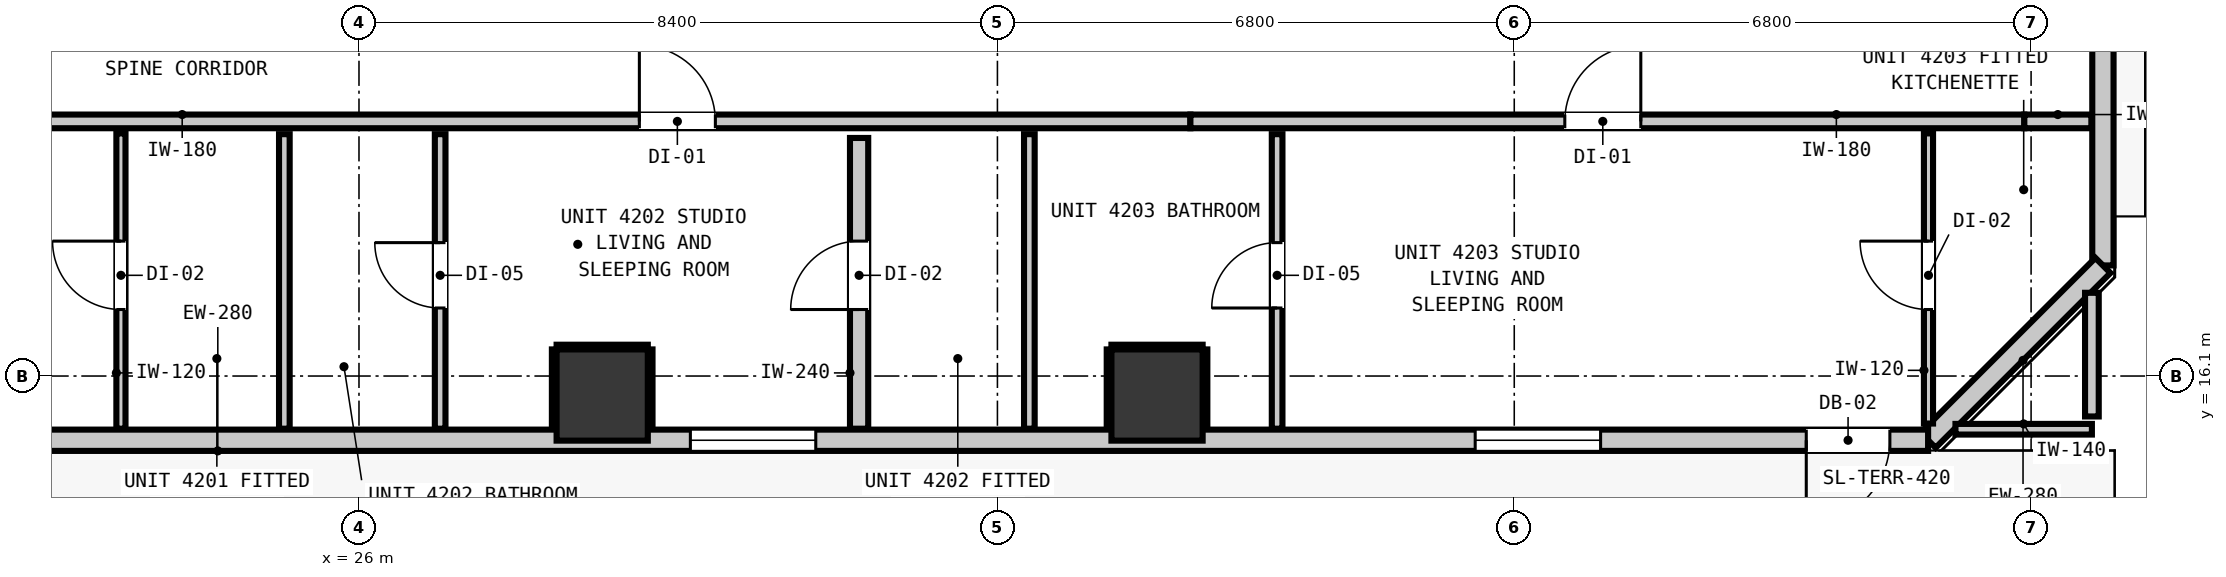
"""IFC4 building model, lengths in metres.
Left out: names, types, materials, properties, quantities, classifications, styles, units other than length and angle.
Written with IfcOpenShell. Run it as: python <this file> out.ifc"""

import sys

from ifc_helpers import new_model, si_unit, direction, frame, frame_2d, origin, origin_2d, place, context, subcontext, project, spatial, rectangle, extrude, element, fill, save


model = new_model("IFC4")
c1 = context("Model", 3, precision=1e-05, world=origin(), true_north=direction((0.0, 1.0)))
c2 = subcontext(c1, "Body", "Model", "MODEL_VIEW")
j1 = project(units=[si_unit("LENGTHUNIT", "METRE"), si_unit("PLANEANGLEUNIT", "RADIAN")], contexts=[c1])
p1 = place(None, origin())
s1 = spatial("IfcSite", under=j1, at=p1, CompositionType="ELEMENT")
p2 = place(p1, origin())
s2 = spatial("IfcBuilding", under=s1, at=p2, CompositionType="ELEMENT")
p3 = place(p2, frame((0.0, 0.0, 145.92)))
s3 = spatial("IfcBuildingStorey", under=s2, at=p3, CompositionType="ELEMENT", Elevation=145.92)
for number, where, z_axis, x_axis in (
    (1, (29.2, 15.85, -0.2), (0.0, 0.0, 1.0), (1.0, 0.0, 0.0)),
    (2, (36.5, 15.85, -0.2), (0.0, 0.0, 1.0), (1.0, 0.0, 0.0)),
):
    element("IfcColumn", number, at=place(p3, frame(where, z_axis=z_axis, x_axis=x_axis)), inside=s3, PredefinedType="COLUMN", context=c2, shape_type="SweptSolid", body=[
        extrude(rectangle(XDim=1.2, YDim=1.2, at=origin_2d()), origin(), (0.0, 0.0, 1.0), 3.52),
    ])
p4 = place(p3, frame((48.945, 49.845, 0.0), z_axis=(0.0, 0.0, 1.0), x_axis=(0.0, -1.0, 0.0)))
e3 = element("IfcWall", 3, at=p4, inside=s3, PredefinedType="STANDARD", context=c2, shape_type="SweptSolid", body=[
    extrude(rectangle(XDim=32.29, YDim=0.28, at=frame_2d((16.145, 0.0))), origin(), (0.0, 0.0, 1.0), 3.08),
])
p5 = place(p4, frame((0.904, 0.0, 0.0)))
e4 = element("IfcOpeningElement", 4, at=p5, cuts=e3, PredefinedType="OPENING", context=c2, shape_type="SweptSolid", body=[
    extrude(rectangle(XDim=1.0, YDim=2.15, at=frame_2d((0.5, 1.075))), frame((0.0, 0.15, 0.0), z_axis=(0.0, -1.0, 0.0), x_axis=(1.0, 0.0, 0.0)), (0.0, 0.0, 1.0), 0.3),
])
p6 = place(p4, frame((2.774, 0.0, 0.85)))
e5 = element("IfcOpeningElement", 5, at=p6, cuts=e3, PredefinedType="OPENING", context=c2, shape_type="SweptSolid", body=[
    extrude(rectangle(XDim=1.65, YDim=1.75, at=frame_2d((0.825, 0.875))), frame((0.0, 0.15, 0.0), z_axis=(0.0, -1.0, 0.0), x_axis=(1.0, 0.0, 0.0)), (0.0, 0.0, 1.0), 0.3),
])
p7 = place(p4, frame((23.582, 0.0, 0.85)))
e6 = element("IfcOpeningElement", 6, at=p7, cuts=e3, PredefinedType="OPENING", context=c2, shape_type="SweptSolid", body=[
    extrude(rectangle(XDim=1.65, YDim=1.75, at=frame_2d((0.825, 0.875))), frame((0.0, 0.15, 0.0), z_axis=(0.0, -1.0, 0.0), x_axis=(1.0, 0.0, 0.0)), (0.0, 0.0, 1.0), 0.3),
])
p8 = place(p4, frame((20.433, 0.0, 0.85)))
e7 = element("IfcOpeningElement", 7, at=p8, cuts=e3, PredefinedType="OPENING", context=c2, shape_type="SweptSolid", body=[
    extrude(rectangle(XDim=1.65, YDim=1.75, at=frame_2d((0.825, 0.875))), frame((0.0, 0.15, 0.0), z_axis=(0.0, -1.0, 0.0), x_axis=(1.0, 0.0, 0.0)), (0.0, 0.0, 1.0), 0.3),
])
p9 = place(p4, frame((14.048, 0.0, 0.85)))
e8 = element("IfcOpeningElement", 8, at=p9, cuts=e3, PredefinedType="OPENING", context=c2, shape_type="SweptSolid", body=[
    extrude(rectangle(XDim=1.65, YDim=1.75, at=frame_2d((0.825, 0.875))), frame((0.0, 0.15, 0.0), z_axis=(0.0, -1.0, 0.0), x_axis=(1.0, 0.0, 0.0)), (0.0, 0.0, 1.0), 0.3),
])
p10 = place(p4, frame((11.247, 0.0, 0.85)))
e9 = element("IfcOpeningElement", 9, at=p10, cuts=e3, PredefinedType="OPENING", context=c2, shape_type="SweptSolid", body=[
    extrude(rectangle(XDim=1.05, YDim=1.65, at=frame_2d((0.525, 0.825))), frame((0.0, 0.15, 0.0), z_axis=(0.0, -1.0, 0.0), x_axis=(1.0, 0.0, 0.0)), (0.0, 0.0, 1.0), 0.3),
])
p11 = place(p3, frame((48.945, 17.555, 0.0), z_axis=(0.0, 0.0, 1.0), x_axis=(-0.707106781187, -0.707106781187, 0.0)))
e10 = element("IfcWall", 10, at=p11, inside=s3, PredefinedType="STANDARD", context=c2, shape_type="SweptSolid", body=[
    extrude(rectangle(XDim=3.253, YDim=0.28, at=frame_2d((1.626, 0.0))), origin(), (0.0, 0.0, 1.0), 3.08),
])
p12 = place(p3, frame((46.645, 15.255, 0.0), z_axis=(0.0, 0.0, 1.0), x_axis=(-1.0, 0.0, 0.0)))
e11 = element("IfcWall", 11, at=p12, inside=s3, PredefinedType="STANDARD", context=c2, shape_type="SweptSolid", body=[
    extrude(rectangle(XDim=35.09, YDim=0.28, at=frame_2d((17.545, 0.0))), origin(), (0.0, 0.0, 1.0), 3.08),
])
p13 = place(p12, frame((0.503, 0.0, 0.0)))
e12 = element("IfcOpeningElement", 12, at=p13, cuts=e11, PredefinedType="OPENING", context=c2, shape_type="SweptSolid", body=[
    extrude(rectangle(XDim=1.1, YDim=2.15, at=frame_2d((0.55, 1.075))), frame((0.0, 0.15, 0.0), z_axis=(0.0, -1.0, 0.0), x_axis=(1.0, 0.0, 0.0)), (0.0, 0.0, 1.0), 0.3),
])
p14 = place(p12, frame((28.72, 0.0, 0.85)))
e13 = element("IfcOpeningElement", 13, at=p14, cuts=e11, PredefinedType="OPENING", context=c2, shape_type="SweptSolid", body=[
    extrude(rectangle(XDim=1.65, YDim=1.75, at=frame_2d((0.825, 0.875))), frame((0.0, 0.15, 0.0), z_axis=(0.0, -1.0, 0.0), x_axis=(1.0, 0.0, 0.0)), (0.0, 0.0, 1.0), 0.3),
])
p15 = place(p12, frame((14.635, 0.0, 0.85)))
e14 = element("IfcOpeningElement", 14, at=p15, cuts=e11, PredefinedType="OPENING", context=c2, shape_type="SweptSolid", body=[
    extrude(rectangle(XDim=1.65, YDim=1.75, at=frame_2d((0.825, 0.875))), frame((0.0, 0.15, 0.0), z_axis=(0.0, -1.0, 0.0), x_axis=(1.0, 0.0, 0.0)), (0.0, 0.0, 1.0), 0.3),
])
p16 = place(p12, frame((4.309, 0.0, 0.85)))
e15 = element("IfcOpeningElement", 15, at=p16, cuts=e11, PredefinedType="OPENING", context=c2, shape_type="SweptSolid", body=[
    extrude(rectangle(XDim=1.65, YDim=1.75, at=frame_2d((0.825, 0.875))), frame((0.0, 0.15, 0.0), z_axis=(0.0, -1.0, 0.0), x_axis=(1.0, 0.0, 0.0)), (0.0, 0.0, 1.0), 0.3),
])
p17 = place(p3, frame((9.407, 19.45, 0.0), z_axis=(0.0, 0.0, 1.0), x_axis=(1.0, 0.0, 0.0)))
e16 = element("IfcWall", 16, at=p17, inside=s3, PredefinedType="PARTITIONING", context=c2, shape_type="SweptSolid", body=[
    extrude(rectangle(XDim=27.532, YDim=0.18, at=frame_2d((13.766, 0.0))), origin(), (0.0, 0.0, 1.0), 3.08),
])
p18 = place(p17, frame((7.252, 0.0, 0.0)))
e17 = element("IfcOpeningElement", 17, at=p18, cuts=e16, PredefinedType="OPENING", context=c2, shape_type="SweptSolid", body=[
    extrude(rectangle(XDim=1.0, YDim=2.15, at=frame_2d((0.5, 1.075))), frame((0.0, 0.1, 0.0), z_axis=(0.0, -1.0, 0.0), x_axis=(1.0, 0.0, 0.0)), (0.0, 0.0, 1.0), 0.2),
])
p19 = place(p17, frame((20.282, 0.0, 0.0)))
e18 = element("IfcOpeningElement", 18, at=p19, cuts=e16, PredefinedType="OPENING", context=c2, shape_type="SweptSolid", body=[
    extrude(rectangle(XDim=1.0, YDim=2.15, at=frame_2d((0.5, 1.075))), frame((0.0, 0.1, 0.0), z_axis=(0.0, -1.0, 0.0), x_axis=(1.0, 0.0, 0.0)), (0.0, 0.0, 1.0), 0.2),
])
p20 = place(p3, frame((36.939, 19.45, 0.0), z_axis=(0.0, 0.0, 1.0), x_axis=(1.0, 0.0, 0.0)))
e19 = element("IfcWall", 19, at=p20, inside=s3, PredefinedType="PARTITIONING", context=c2, shape_type="SweptSolid", body=[
    extrude(rectangle(XDim=10.972, YDim=0.18, at=frame_2d((5.486, 0.0))), origin(), (0.0, 0.0, 1.0), 2.565),
])
p21 = place(p20, frame((4.926, 0.0, 0.0)))
e20 = element("IfcOpeningElement", 20, at=p21, cuts=e19, PredefinedType="OPENING", context=c2, shape_type="SweptSolid", body=[
    extrude(rectangle(XDim=1.0, YDim=2.15, at=frame_2d((0.5, 1.075))), frame((0.0, 0.1, 0.0), z_axis=(0.0, -1.0, 0.0), x_axis=(1.0, 0.0, 0.0)), (0.0, 0.0, 1.0), 0.2),
])
p22 = place(p3, frame((47.911, 19.45, 0.0), z_axis=(0.0, 0.0, 1.0), x_axis=(1.0, 0.0, 0.0)))
e21 = element("IfcWall", 21, at=p22, inside=s3, PredefinedType="PARTITIONING", context=c2, shape_type="SweptSolid", body=[
    extrude(rectangle(XDim=0.882, YDim=0.18, at=frame_2d((0.441, 0.0))), origin(), (0.0, 0.0, 1.0), 3.08),
])
p23 = place(p3, frame((47.005, 15.4, 0.0), z_axis=(0.0, 0.0, 1.0), x_axis=(1.0, 0.0, 0.0)))
e22 = element("IfcWall", 22, at=p23, inside=s3, PredefinedType="PARTITIONING", context=c2, shape_type="SweptSolid", body=[
    extrude(rectangle(XDim=1.795, YDim=0.14, at=frame_2d((0.897, 0.0))), origin(), (0.0, 0.0, 1.0), 3.08),
])
p24 = place(p3, frame((32.58, 15.407, 0.0), z_axis=(0.0, 0.0, 1.0), x_axis=(0.0, 1.0, 0.0)))
e23 = element("IfcWall", 23, at=p24, inside=s3, PredefinedType="PARTITIONING", context=c2, shape_type="SweptSolid", body=[
    extrude(rectangle(XDim=3.825, YDim=0.24, at=frame_2d((1.913, 0.0))), origin(), (0.0, 0.0, 1.0), 3.08),
])
p25 = place(p24, frame((1.568, 0.0, 0.0)))
e24 = element("IfcOpeningElement", 24, at=p25, cuts=e23, PredefinedType="OPENING", context=c2, shape_type="SweptSolid", body=[
    extrude(rectangle(XDim=0.9, YDim=2.1, at=frame_2d((0.45, 1.05))), frame((0.0, 0.13, 0.0), z_axis=(0.0, -1.0, 0.0), x_axis=(1.0, 0.0, 0.0)), (0.0, 0.0, 1.0), 0.26),
])
p26 = place(p3, frame((48.8, 15.568, 0.0), z_axis=(0.0, 0.0, 1.0), x_axis=(0.0, 1.0, 0.0)))
e25 = element("IfcWall", 25, at=p26, inside=s3, PredefinedType="PARTITIONING", context=c2, shape_type="SweptSolid", body=[
    extrude(rectangle(XDim=1.627, YDim=0.18, at=frame_2d((0.813, 0.0))), origin(), (0.0, 0.0, 1.0), 3.08),
])
p27 = place(p3, frame((25.018, 15.407, 0.0), z_axis=(0.0, 0.0, 1.0), x_axis=(0.0, 1.0, 0.0)))
e26 = element("IfcWall", 26, at=p27, inside=s3, PredefinedType="PARTITIONING", context=c2, shape_type="SweptSolid", body=[
    extrude(rectangle(XDim=3.875, YDim=0.14, at=frame_2d((1.938, 0.0))), origin(), (0.0, 0.0, 1.0), 3.08),
])
p28 = place(p3, frame((27.068, 15.407, 0.0), z_axis=(0.0, 0.0, 1.0), x_axis=(0.0, 1.0, 0.0)))
e27 = element("IfcWall", 27, at=p28, inside=s3, PredefinedType="PARTITIONING", context=c2, shape_type="SweptSolid", body=[
    extrude(rectangle(XDim=3.875, YDim=0.14, at=frame_2d((1.938, 0.0))), origin(), (0.0, 0.0, 1.0), 3.08),
])
p29 = place(p28, frame((1.588, 0.0, 0.0)))
e28 = element("IfcOpeningElement", 28, at=p29, cuts=e27, PredefinedType="OPENING", context=c2, shape_type="SweptSolid", body=[
    extrude(rectangle(XDim=0.86, YDim=2.02, at=frame_2d((0.43, 1.01))), frame((0.0, 0.08, 0.0), z_axis=(0.0, -1.0, 0.0), x_axis=(1.0, 0.0, 0.0)), (0.0, 0.0, 1.0), 0.16),
])
p30 = place(p3, frame((34.82, 15.407, 0.0), z_axis=(0.0, 0.0, 1.0), x_axis=(0.0, 1.0, 0.0)))
e29 = element("IfcWall", 29, at=p30, inside=s3, PredefinedType="PARTITIONING", context=c2, shape_type="SweptSolid", body=[
    extrude(rectangle(XDim=3.875, YDim=0.14, at=frame_2d((1.938, 0.0))), origin(), (0.0, 0.0, 1.0), 3.08),
])
p31 = place(p3, frame((38.08, 15.407, 0.0), z_axis=(0.0, 0.0, 1.0), x_axis=(0.0, 1.0, 0.0)))
e30 = element("IfcWall", 30, at=p31, inside=s3, PredefinedType="PARTITIONING", context=c2, shape_type="SweptSolid", body=[
    extrude(rectangle(XDim=3.875, YDim=0.14, at=frame_2d((1.938, 0.0))), origin(), (0.0, 0.0, 1.0), 3.08),
])
p32 = place(p31, frame((1.588, 0.0, 0.0)))
e31 = element("IfcOpeningElement", 31, at=p32, cuts=e30, PredefinedType="OPENING", context=c2, shape_type="SweptSolid", body=[
    extrude(rectangle(XDim=0.86, YDim=2.02, at=frame_2d((0.43, 1.01))), frame((0.0, 0.08, 0.0), z_axis=(0.0, -1.0, 0.0), x_axis=(1.0, 0.0, 0.0)), (0.0, 0.0, 1.0), 0.16),
])
p33 = place(p3, frame((22.868, 15.407, 0.0), z_axis=(0.0, 0.0, 1.0), x_axis=(0.0, 1.0, 0.0)))
e32 = element("IfcWall", 32, at=p33, inside=s3, PredefinedType="PARTITIONING", context=c2, shape_type="SweptSolid", body=[
    extrude(rectangle(XDim=3.885, YDim=0.12, at=frame_2d((1.942, 0.0))), origin(), (0.0, 0.0, 1.0), 3.08),
])
p34 = place(p33, frame((1.568, 0.0, 0.0)))
e33 = element("IfcOpeningElement", 33, at=p34, cuts=e32, PredefinedType="OPENING", context=c2, shape_type="SweptSolid", body=[
    extrude(rectangle(XDim=0.9, YDim=2.1, at=frame_2d((0.45, 1.05))), frame((0.0, 0.07, 0.0), z_axis=(0.0, -1.0, 0.0), x_axis=(1.0, 0.0, 0.0)), (0.0, 0.0, 1.0), 0.14),
])
p35 = place(p3, frame((46.65, 15.475, 0.0), z_axis=(0.0, 0.0, 1.0), x_axis=(0.0, 1.0, 0.0)))
e34 = element("IfcWall", 34, at=p35, inside=s3, PredefinedType="PARTITIONING", context=c2, shape_type="SweptSolid", body=[
    extrude(rectangle(XDim=3.817, YDim=0.12, at=frame_2d((1.908, 0.0))), origin(), (0.0, 0.0, 1.0), 3.08),
])
p36 = place(p35, frame((1.5, 0.0, 0.0)))
e35 = element("IfcOpeningElement", 35, at=p36, cuts=e34, PredefinedType="OPENING", context=c2, shape_type="SweptSolid", body=[
    extrude(rectangle(XDim=0.9, YDim=2.1, at=frame_2d((0.45, 1.05))), frame((0.0, 0.07, 0.0), z_axis=(0.0, -1.0, 0.0), x_axis=(1.0, 0.0, 0.0)), (0.0, 0.0, 1.0), 0.14),
])
p37 = place(p3, frame((28.6, 16.482, 0.0), z_axis=(0.0, 0.0, 1.0), x_axis=(1.0, 0.0, 0.0)))
e36 = element("IfcWall", 36, at=p37, inside=s3, PredefinedType="PARTITIONING", context=c2, shape_type="SweptSolid", body=[
    extrude(rectangle(XDim=1.2, YDim=0.06, at=frame_2d((0.6, 0.0))), origin(), (0.0, 0.0, 1.0), 1.45),
])
for number, where, z_axis, x_axis in (
    (37, (28.568, 15.41, 0.0), (0.0, 0.0, 1.0), (0.0, 1.0, 0.0)),
    (38, (29.832, 15.41, 0.0), (0.0, 0.0, 1.0), (0.0, 1.0, 0.0)),
):
    element("IfcWall", number, at=place(p3, frame(where, z_axis=z_axis, x_axis=x_axis)), inside=s3, PredefinedType="PARTITIONING", context=c2, shape_type="SweptSolid", body=[
        extrude(rectangle(XDim=1.04, YDim=0.06, at=frame_2d((0.52, 0.0))), origin(), (0.0, 0.0, 1.0), 1.45),
    ])
p38 = place(p3, frame((35.9, 16.482, 0.0), z_axis=(0.0, 0.0, 1.0), x_axis=(1.0, 0.0, 0.0)))
e39 = element("IfcWall", 39, at=p38, inside=s3, PredefinedType="PARTITIONING", context=c2, shape_type="SweptSolid", body=[
    extrude(rectangle(XDim=1.2, YDim=0.06, at=frame_2d((0.6, 0.0))), origin(), (0.0, 0.0, 1.0), 1.45),
])
for number, where, z_axis, x_axis in (
    (40, (35.868, 15.41, 0.0), (0.0, 0.0, 1.0), (0.0, 1.0, 0.0)),
    (41, (37.132, 15.41, 0.0), (0.0, 0.0, 1.0), (0.0, 1.0, 0.0)),
):
    element("IfcWall", number, at=place(p3, frame(where, z_axis=z_axis, x_axis=x_axis)), inside=s3, PredefinedType="PARTITIONING", context=c2, shape_type="SweptSolid", body=[
        extrude(rectangle(XDim=1.04, YDim=0.06, at=frame_2d((0.52, 0.0))), origin(), (0.0, 0.0, 1.0), 1.45),
    ])
p39 = place(p13, origin())
e42 = element("IfcDoor", 42, at=p39, inside=s3, OperationType="SINGLE_SWING_RIGHT", PredefinedType="DOOR", context=c2, shape_type="SweptSolid", body=[
    extrude(rectangle(XDim=1.1, YDim=2.15, at=frame_2d((0.55, 1.075))), frame((0.0, 0.025, 0.0), z_axis=(0.0, -1.0, 0.0), x_axis=(1.0, 0.0, 0.0)), (0.0, 0.0, 1.0), 0.05),
])
fill(e12, e42)
p40 = place(p15, origin())
e43 = element("IfcWindow", 43, at=p40, inside=s3, PartitioningType="SINGLE_PANEL", PredefinedType="WINDOW", context=c2, shape_type="SweptSolid", body=[
    extrude(rectangle(XDim=1.65, YDim=1.75, at=frame_2d((0.825, 0.875))), frame((0.0, 0.03, 0.0), z_axis=(0.0, -1.0, 0.0), x_axis=(1.0, 0.0, 0.0)), (0.0, 0.0, 1.0), 0.06),
])
fill(e14, e43)
p41 = place(p16, origin())
e44 = element("IfcWindow", 44, at=p41, inside=s3, PartitioningType="SINGLE_PANEL", PredefinedType="WINDOW", context=c2, shape_type="SweptSolid", body=[
    extrude(rectangle(XDim=1.65, YDim=1.75, at=frame_2d((0.825, 0.875))), frame((0.0, 0.03, 0.0), z_axis=(0.0, -1.0, 0.0), x_axis=(1.0, 0.0, 0.0)), (0.0, 0.0, 1.0), 0.06),
])
fill(e15, e44)
p42 = place(p34, origin())
e45 = element("IfcDoor", 45, at=p42, inside=s3, OperationType="SINGLE_SWING_RIGHT", PredefinedType="DOOR", context=c2, shape_type="SweptSolid", body=[
    extrude(rectangle(XDim=0.9, YDim=2.1, at=frame_2d((0.45, 1.05))), frame((0.0, 0.025, 0.0), z_axis=(0.0, -1.0, 0.0), x_axis=(1.0, 0.0, 0.0)), (0.0, 0.0, 1.0), 0.05),
])
fill(e33, e45)
p43 = place(p19, origin())
e46 = element("IfcDoor", 46, at=p43, inside=s3, OperationType="SINGLE_SWING_LEFT", PredefinedType="DOOR", context=c2, shape_type="SweptSolid", body=[
    extrude(rectangle(XDim=1.0, YDim=2.15, at=frame_2d((0.5, 1.075))), frame((0.0, 0.025, 0.0), z_axis=(0.0, -1.0, 0.0), x_axis=(1.0, 0.0, 0.0)), (0.0, 0.0, 1.0), 0.05),
])
fill(e18, e46)
p44 = place(p29, origin())
e47 = element("IfcDoor", 47, at=p44, inside=s3, OperationType="SINGLE_SWING_RIGHT", PredefinedType="DOOR", context=c2, shape_type="SweptSolid", body=[
    extrude(rectangle(XDim=0.86, YDim=2.02, at=frame_2d((0.43, 1.01))), frame((0.0, 0.025, 0.0), z_axis=(0.0, -1.0, 0.0), x_axis=(1.0, 0.0, 0.0)), (0.0, 0.0, 1.0), 0.05),
])
fill(e28, e47)
p45 = place(p25, origin())
e48 = element("IfcDoor", 48, at=p45, inside=s3, OperationType="SINGLE_SWING_LEFT", PredefinedType="DOOR", context=c2, shape_type="SweptSolid", body=[
    extrude(rectangle(XDim=0.9, YDim=2.1, at=frame_2d((0.45, 1.05))), frame((0.0, 0.025, 0.0), z_axis=(0.0, -1.0, 0.0), x_axis=(1.0, 0.0, 0.0)), (0.0, 0.0, 1.0), 0.05),
])
fill(e24, e48)
p46 = place(p21, origin())
e49 = element("IfcDoor", 49, at=p46, inside=s3, OperationType="SINGLE_SWING_RIGHT", PredefinedType="DOOR", context=c2, shape_type="SweptSolid", body=[
    extrude(rectangle(XDim=1.0, YDim=2.15, at=frame_2d((0.5, 1.075))), frame((0.0, 0.025, 0.0), z_axis=(0.0, -1.0, 0.0), x_axis=(1.0, 0.0, 0.0)), (0.0, 0.0, 1.0), 0.05),
])
fill(e20, e49)
p47 = place(p32, origin())
e50 = element("IfcDoor", 50, at=p47, inside=s3, OperationType="SINGLE_SWING_LEFT", PredefinedType="DOOR", context=c2, shape_type="SweptSolid", body=[
    extrude(rectangle(XDim=0.86, YDim=2.02, at=frame_2d((0.43, 1.01))), frame((0.0, 0.025, 0.0), z_axis=(0.0, -1.0, 0.0), x_axis=(1.0, 0.0, 0.0)), (0.0, 0.0, 1.0), 0.05),
])
fill(e31, e50)
p48 = place(p36, origin())
e51 = element("IfcDoor", 51, at=p48, inside=s3, OperationType="SINGLE_SWING_RIGHT", PredefinedType="DOOR", context=c2, shape_type="SweptSolid", body=[
    extrude(rectangle(XDim=0.9, YDim=2.1, at=frame_2d((0.45, 1.05))), frame((0.0, 0.025, 0.0), z_axis=(0.0, -1.0, 0.0), x_axis=(1.0, 0.0, 0.0)), (0.0, 0.0, 1.0), 0.05),
])
fill(e35, e51)
save(model, sys.argv[1])
